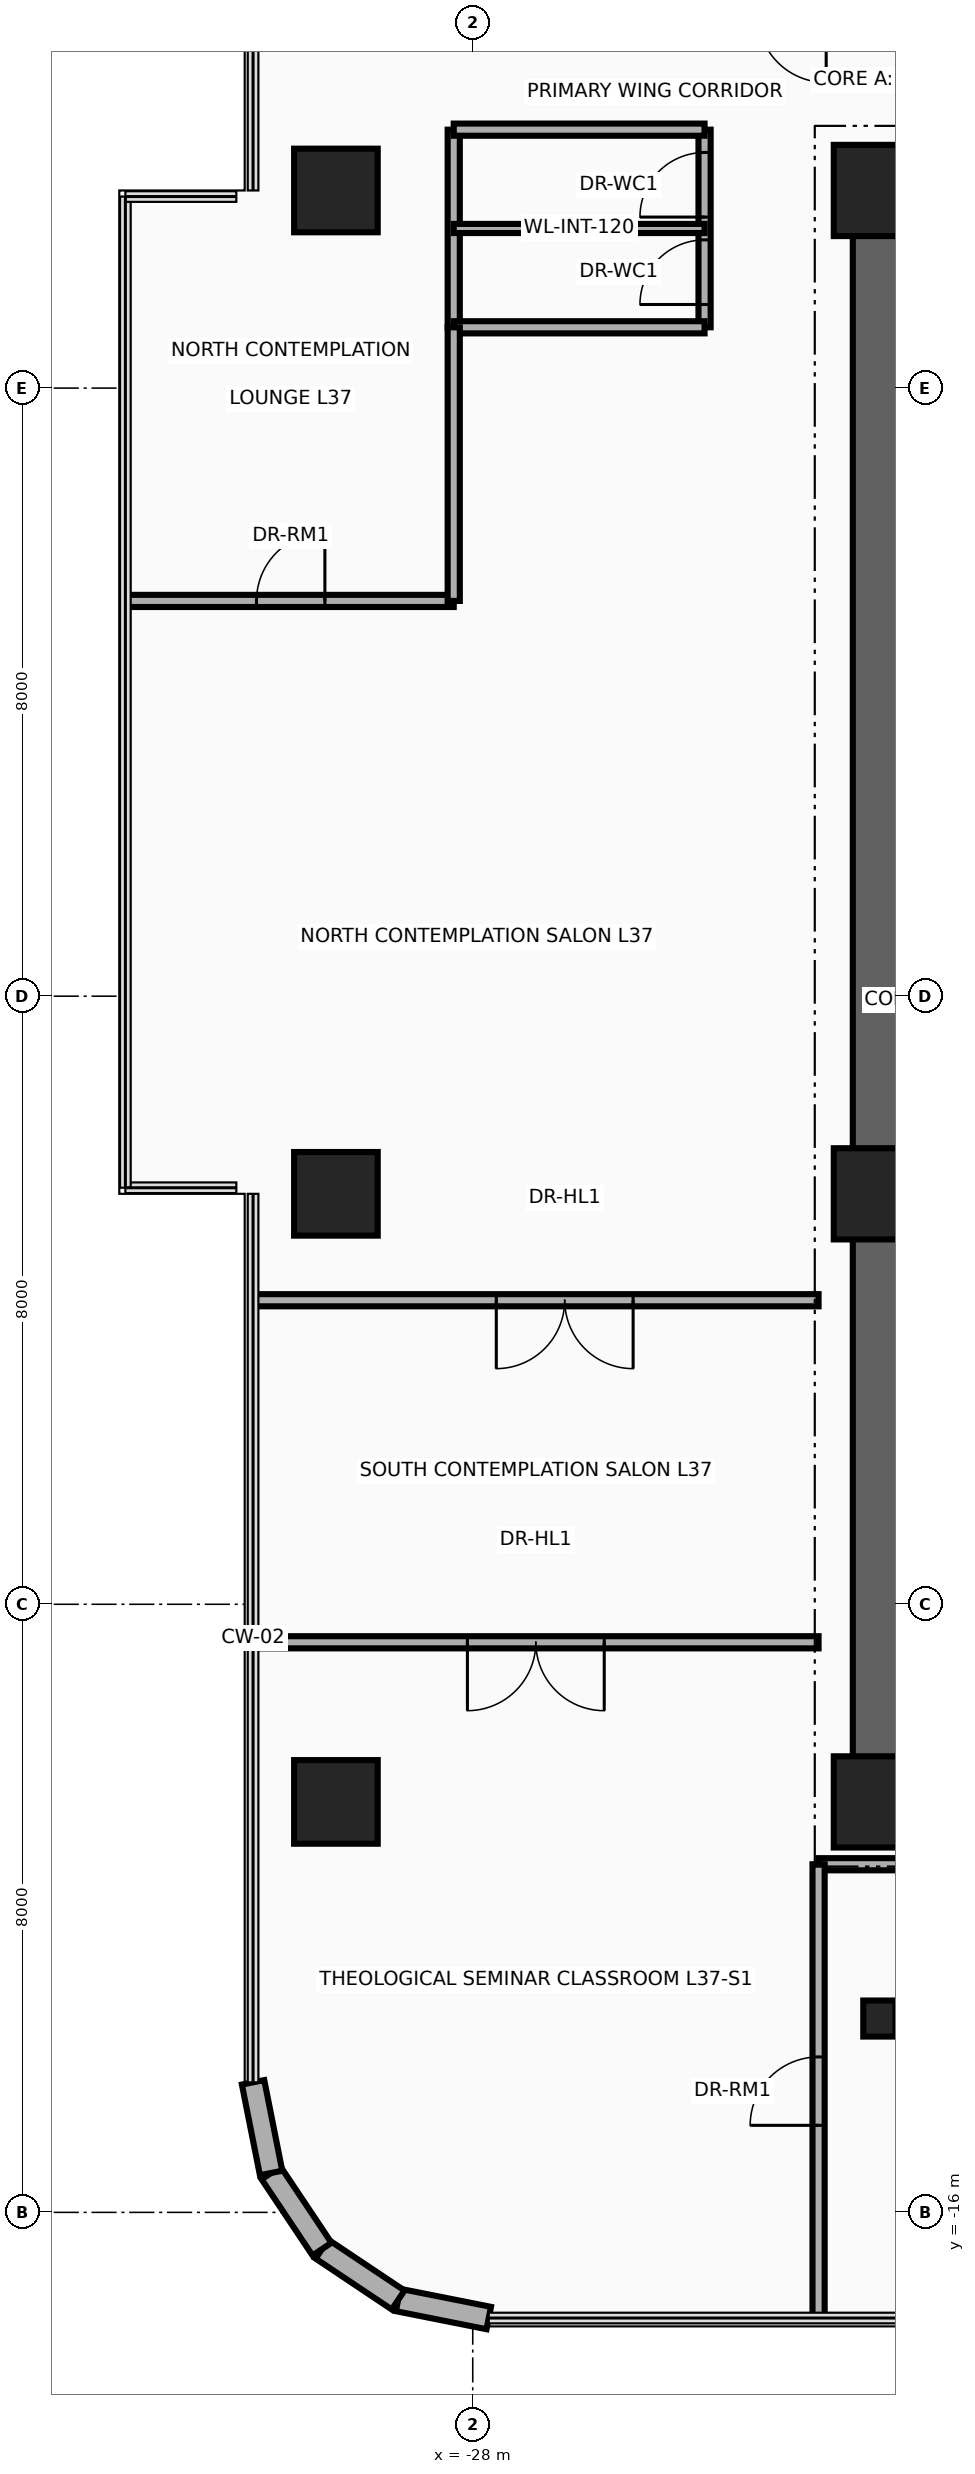
"""IFC4 building model, lengths in metres.
Left out: names, types, materials, properties, quantities, classifications, styles, units other than length and angle.
Written with IfcOpenShell. Run it as: python <this file> out.ifc"""

import sys

from ifc_helpers import new_model, si_unit, direction, frame, frame_2d, origin, origin_2d, place, context, subcontext, project, spatial, rectangle, circle, i_section, extrude, source, transform, mapped, element, fill, save


model = new_model("IFC4")
c1 = context("Model", 3, precision=1e-05, world=origin(), true_north=direction((0.0, 1.0)))
c2 = subcontext(c1, "Body", "Model", "MODEL_VIEW")
j1 = project(units=[si_unit("LENGTHUNIT", "METRE"), si_unit("PLANEANGLEUNIT", "RADIAN")], contexts=[c1])
p1 = place(None, origin())
s1 = spatial("IfcSite", under=j1, at=p1, CompositionType="ELEMENT")
p2 = place(p1, origin())
s2 = spatial("IfcBuilding", under=s1, at=p2, CompositionType="ELEMENT")
p3 = place(p2, frame((0.0, 0.0, 146.4)))
s3 = spatial("IfcBuildingStorey", under=s2, at=p3, CompositionType="ELEMENT", Elevation=146.4)
p4 = place(p3, frame((-22.65, -11.15, 0.0), z_axis=(0.0, 0.0, 1.0), x_axis=(0.0, 1.0, 0.0)))
e1 = element("IfcWall", 1, at=p4, inside=s3, PredefinedType="SHEAR", context=c2, shape_type="SweptSolid", body=[
    extrude(rectangle(XDim=22.3, YDim=0.7, at=frame_2d((11.15, 0.0))), origin(), (0.0, 0.0, 1.0), 3.46),
])
for number, where, z_axis, x_axis in (
    (2, (-22.65, 10.8, 0.0), (0.0, 0.0, 1.0), (1.0, 0.0, 0.0)),
    (3, (-22.65, -10.8, 0.0), (0.0, 0.0, 1.0), (1.0, 0.0, 0.0)),
):
    element("IfcWall", number, at=place(p3, frame(where, z_axis=z_axis, x_axis=x_axis)), inside=s3, PredefinedType="SHEAR", context=c2, shape_type="SweptSolid", body=[
        extrude(rectangle(XDim=10.25, YDim=0.7, at=frame_2d((5.125, 0.0))), origin(), (0.0, 0.0, 1.0), 3.46),
    ])
m1 = source(origin(), c2, "Body", "SweptSolid", [
    extrude(circle(Radius=0.55, at=origin_2d()), origin(), (0.0, 0.0, 1.0), 3.7),
])
p5 = place(p3, frame((-29.8, -10.6, 0.0), z_axis=(0.0, 0.0, 1.0), x_axis=(1.0, 0.0, 0.0)))
e4 = element("IfcColumn", 4, at=p5, inside=s3, PredefinedType="COLUMN", context=c2, shape_type="MappedRepresentation", body=[
    mapped(m1, transform((0.0, 0.0, 0.0), x_axis=(1.0, 0.0, 0.0), y_axis=(0.0, 1.0, 0.0), z_axis=(0.0, 0.0, 1.0), scale=1.0)),
])
m2 = source(origin(), c2, "Body", "SweptSolid", [
    extrude(rectangle(XDim=1.2, YDim=1.2, at=origin_2d()), origin(), (0.0, 0.0, 1.0), 3.7),
])
p6 = place(p3, frame((-22.65, -10.6, 0.0), z_axis=(0.0, 0.0, 1.0), x_axis=(1.0, 0.0, 0.0)))
e5 = element("IfcColumn", 5, at=p6, inside=s3, PredefinedType="COLUMN", context=c2, shape_type="MappedRepresentation", body=[
    mapped(m2, transform((0.0, 0.0, 0.0), x_axis=(1.0, 0.0, 0.0), y_axis=(0.0, 1.0, 0.0), z_axis=(0.0, 0.0, 1.0), scale=1.0)),
])
p7 = place(p3, frame((-29.8, -2.6, 0.0), z_axis=(0.0, 0.0, 1.0), x_axis=(1.0, 0.0, 0.0)))
e6 = element("IfcColumn", 6, at=p7, inside=s3, PredefinedType="COLUMN", context=c2, shape_type="MappedRepresentation", body=[
    mapped(m1, transform((0.0, 0.0, 0.0), x_axis=(1.0, 0.0, 0.0), y_axis=(0.0, 1.0, 0.0), z_axis=(0.0, 0.0, 1.0), scale=1.0)),
])
p8 = place(p3, frame((-22.65, -2.6, 0.0), z_axis=(0.0, 0.0, 1.0), x_axis=(1.0, 0.0, 0.0)))
e7 = element("IfcColumn", 7, at=p8, inside=s3, PredefinedType="COLUMN", context=c2, shape_type="MappedRepresentation", body=[
    mapped(m2, transform((0.0, 0.0, 0.0), x_axis=(1.0, 0.0, 0.0), y_axis=(0.0, 1.0, 0.0), z_axis=(0.0, 0.0, 1.0), scale=1.0)),
])
p9 = place(p3, frame((-29.8, 10.6, 0.0), z_axis=(0.0, 0.0, 1.0), x_axis=(1.0, 0.0, 0.0)))
e8 = element("IfcColumn", 8, at=p9, inside=s3, PredefinedType="COLUMN", context=c2, shape_type="MappedRepresentation", body=[
    mapped(m1, transform((0.0, 0.0, 0.0), x_axis=(1.0, 0.0, 0.0), y_axis=(0.0, 1.0, 0.0), z_axis=(0.0, 0.0, 1.0), scale=1.0)),
])
p10 = place(p3, frame((-22.65, 10.6, 0.0), z_axis=(0.0, 0.0, 1.0), x_axis=(1.0, 0.0, 0.0)))
e9 = element("IfcColumn", 9, at=p10, inside=s3, PredefinedType="COLUMN", context=c2, shape_type="MappedRepresentation", body=[
    mapped(m2, transform((0.0, 0.0, 0.0), x_axis=(1.0, 0.0, 0.0), y_axis=(0.0, 1.0, 0.0), z_axis=(0.0, 0.0, 1.0), scale=1.0)),
])
m3 = source(origin(), c2, "Body", "SweptSolid", [
    extrude(i_section(OverallWidth=0.424, OverallDepth=0.474, WebThickness=0.048, FlangeThickness=0.077, at=origin_2d()), origin(), (0.0, 0.0, 1.0), 3.7),
])
p11 = place(p3, frame((-22.65, -13.45, 0.0), z_axis=(0.0, 0.0, 1.0), x_axis=(1.0, 0.0, 0.0)))
e10 = element("IfcColumn", 10, at=p11, inside=s3, PredefinedType="COLUMN", context=c2, shape_type="MappedRepresentation", body=[
    mapped(m3, transform((0.0, 0.0, 0.0), x_axis=(1.0, 0.0, 0.0), y_axis=(0.0, 1.0, 0.0), z_axis=(0.0, 0.0, 1.0), scale=1.0)),
])
p12 = place(p3, frame((-27.789, -17.39, 0.0), z_axis=(0.0, 0.0, 1.0), x_axis=(-0.980804027463, 0.194996050505, 0.0)))
e11 = element("IfcWall", 11, at=p12, inside=s3, PredefinedType="SOLIDWALL", context=c2, shape_type="SweptSolid", body=[
    extrude(rectangle(XDim=1.216, YDim=0.3, at=frame_2d((0.608, 0.0))), origin(), (0.0, 0.0, 1.0), 3.46),
])
for number, where, z_axis, x_axis in (
    (12, (-28.982, -17.153, 0.0), (0.0, 0.0, 1.0), (-0.831, 0.556, 0.0)),
    (13, (-29.983, -16.483, 0.0), (0.0, 0.0, 1.0), (-0.556, 0.831, 0.0)),
):
    element("IfcWall", number, at=place(p3, frame(where, z_axis=z_axis, x_axis=x_axis)), inside=s3, PredefinedType="SOLIDWALL", context=c2, shape_type="SweptSolid", body=[
        extrude(rectangle(XDim=1.205, YDim=0.3, at=frame_2d((0.603, 0.0))), origin(), (0.0, 0.0, 1.0), 3.46),
    ])
p13 = place(p3, frame((-30.653, -15.482, 0.0), z_axis=(0.0, 0.0, 1.0), x_axis=(-0.194996050505, 0.980804027463, 0.0)))
e14 = element("IfcWall", 14, at=p13, inside=s3, PredefinedType="SOLIDWALL", context=c2, shape_type="SweptSolid", body=[
    extrude(rectangle(XDim=1.216, YDim=0.3, at=frame_2d((0.608, 0.0))), origin(), (0.0, 0.0, 1.0), 3.46),
])
p14 = place(p3, frame((-28.25, 8.8, 0.0), z_axis=(0.0, 0.0, 1.0), x_axis=(0.0, 1.0, 0.0)))
e15 = element("IfcWall", 15, at=p14, inside=s3, PredefinedType="PARTITIONING", context=c2, shape_type="SweptSolid", body=[
    extrude(rectangle(XDim=2.6, YDim=0.16, at=frame_2d((1.3, 0.0))), origin(), (0.0, 0.0, 1.0), 2.666),
])
p15 = place(p3, frame((-24.95, 8.8, 0.0), z_axis=(0.0, 0.0, 1.0), x_axis=(0.0, 1.0, 0.0)))
e16 = element("IfcWall", 16, at=p15, inside=s3, PredefinedType="PARTITIONING", context=c2, shape_type="SweptSolid", body=[
    extrude(rectangle(XDim=2.6, YDim=0.16, at=frame_2d((1.3, 0.0))), origin(), (0.0, 0.0, 1.0), 2.666),
])
p16 = place(p15, frame((0.3, 0.0, 0.0)))
e17 = element("IfcOpeningElement", 17, at=p16, cuts=e16, PredefinedType="OPENING", context=c2, shape_type="SweptSolid", body=[
    extrude(rectangle(XDim=0.85, YDim=2.1, at=frame_2d((0.425, 1.05))), frame((0.0, 0.095, 0.0), z_axis=(0.0, -1.0, 0.0), x_axis=(1.0, 0.0, 0.0)), (0.0, 0.0, 1.0), 0.19),
])
p17 = place(p15, frame((1.45, 0.0, 0.0)))
e18 = element("IfcOpeningElement", 18, at=p17, cuts=e16, PredefinedType="OPENING", context=c2, shape_type="SweptSolid", body=[
    extrude(rectangle(XDim=0.85, YDim=2.1, at=frame_2d((0.425, 1.05))), frame((0.0, 0.095, 0.0), z_axis=(0.0, -1.0, 0.0), x_axis=(1.0, 0.0, 0.0)), (0.0, 0.0, 1.0), 0.19),
])
for number, where, z_axis, x_axis in (
    (19, (-28.25, 8.8, 0.0), (0.0, 0.0, 1.0), (1.0, 0.0, 0.0)),
    (20, (-28.25, 11.4, 0.0), (0.0, 0.0, 1.0), (1.0, 0.0, 0.0)),
):
    element("IfcWall", number, at=place(p3, frame(where, z_axis=z_axis, x_axis=x_axis)), inside=s3, PredefinedType="PARTITIONING", context=c2, shape_type="SweptSolid", body=[
        extrude(rectangle(XDim=3.3, YDim=0.16, at=frame_2d((1.65, 0.0))), origin(), (0.0, 0.0, 1.0), 3.46),
    ])
p18 = place(p3, frame((-28.25, 10.1, 0.0), z_axis=(0.0, 0.0, 1.0), x_axis=(1.0, 0.0, 0.0)))
e21 = element("IfcWall", 21, at=p18, inside=s3, PredefinedType="PARTITIONING", context=c2, shape_type="SweptSolid", body=[
    extrude(rectangle(XDim=3.3, YDim=0.12, at=frame_2d((1.65, 0.0))), origin(), (0.0, 0.0, 1.0), 3.46),
])
p19 = place(p3, frame((-23.45, -11.42, 0.0), z_axis=(0.0, 0.0, 1.0), x_axis=(1.0, 0.0, 0.0)))
e22 = element("IfcWall", 22, at=p19, inside=s3, PredefinedType="PARTITIONING", context=c2, shape_type="SweptSolid", body=[
    extrude(rectangle(XDim=13.84, YDim=0.16, at=frame_2d((6.92, 0.0))), origin(), (0.0, 0.0, 1.0), 2.834),
])
p20 = place(p3, frame((-23.45, -17.39, 0.0), z_axis=(0.0, 0.0, 1.0), x_axis=(0.0, 1.0, 0.0)))
e23 = element("IfcWall", 23, at=p20, inside=s3, PredefinedType="PARTITIONING", context=c2, shape_type="SweptSolid", body=[
    extrude(rectangle(XDim=5.97, YDim=0.16, at=frame_2d((2.985, 0.0))), origin(), (0.0, 0.0, 1.0), 3.46),
])
p21 = place(p20, frame((2.535, 0.0, 0.0)))
e24 = element("IfcOpeningElement", 24, at=p21, cuts=e23, PredefinedType="OPENING", context=c2, shape_type="SweptSolid", body=[
    extrude(rectangle(XDim=0.9, YDim=2.1, at=frame_2d((0.45, 1.05))), frame((0.0, 0.095, 0.0), z_axis=(0.0, -1.0, 0.0), x_axis=(1.0, 0.0, 0.0)), (0.0, 0.0, 1.0), 0.19),
])
p22 = place(p3, frame((-30.89, -8.5, 0.0), z_axis=(0.0, 0.0, 1.0), x_axis=(1.0, 0.0, 0.0)))
e25 = element("IfcWall", 25, at=p22, inside=s3, PredefinedType="PARTITIONING", context=c2, shape_type="SweptSolid", body=[
    extrude(rectangle(XDim=7.44, YDim=0.16, at=frame_2d((3.72, 0.0))), origin(), (0.0, 0.0, 1.0), 2.896),
])
p23 = place(p22, frame((2.82, 0.0, 0.0)))
e26 = element("IfcOpeningElement", 26, at=p23, cuts=e25, PredefinedType="OPENING", context=c2, shape_type="SweptSolid", body=[
    extrude(rectangle(XDim=1.8, YDim=2.15, at=frame_2d((0.9, 1.075))), frame((0.0, 0.095, 0.0), z_axis=(0.0, -1.0, 0.0), x_axis=(1.0, 0.0, 0.0)), (0.0, 0.0, 1.0), 0.19),
])
p24 = place(p3, frame((-32.54, 5.2, 0.0), z_axis=(0.0, 0.0, 1.0), x_axis=(1.0, 0.0, 0.0)))
e27 = element("IfcWall", 27, at=p24, inside=s3, PredefinedType="PARTITIONING", context=c2, shape_type="SweptSolid", body=[
    extrude(rectangle(XDim=4.29, YDim=0.16, at=frame_2d((2.145, 0.0))), origin(), (0.0, 0.0, 1.0), 2.896),
])
p25 = place(p24, frame((1.695, 0.0, 0.0)))
e28 = element("IfcOpeningElement", 28, at=p25, cuts=e27, PredefinedType="OPENING", context=c2, shape_type="SweptSolid", body=[
    extrude(rectangle(XDim=0.9, YDim=2.1, at=frame_2d((0.45, 1.05))), frame((0.0, 0.095, 0.0), z_axis=(0.0, -1.0, 0.0), x_axis=(1.0, 0.0, 0.0)), (0.0, 0.0, 1.0), 0.19),
])
p26 = place(p3, frame((-28.25, 5.2, 0.0), z_axis=(0.0, 0.0, 1.0), x_axis=(0.0, 1.0, 0.0)))
e29 = element("IfcWall", 29, at=p26, inside=s3, PredefinedType="PARTITIONING", context=c2, shape_type="SweptSolid", body=[
    extrude(rectangle(XDim=3.6, YDim=0.16, at=frame_2d((1.8, 0.0))), origin(), (0.0, 0.0, 1.0), 2.988),
])
p27 = place(p3, frame((-30.89, -4.0, 0.0), z_axis=(0.0, 0.0, 1.0), x_axis=(1.0, 0.0, 0.0)))
e30 = element("IfcWall", 30, at=p27, inside=s3, PredefinedType="PARTITIONING", context=c2, shape_type="SweptSolid", body=[
    extrude(rectangle(XDim=7.44, YDim=0.16, at=frame_2d((3.72, 0.0))), origin(), (0.0, 0.0, 1.0), 2.896),
])
p28 = place(p27, frame((3.2, 0.0, 0.0)))
e31 = element("IfcOpeningElement", 31, at=p28, cuts=e30, PredefinedType="OPENING", context=c2, shape_type="SweptSolid", body=[
    extrude(rectangle(XDim=1.8, YDim=2.15, at=frame_2d((0.9, 1.075))), frame((0.0, 0.095, 0.0), z_axis=(0.0, -1.0, 0.0), x_axis=(1.0, 0.0, 0.0)), (0.0, 0.0, 1.0), 0.19),
])
p29 = place(p16, origin())
e32 = element("IfcDoor", 32, at=p29, inside=s3, OperationType="SINGLE_SWING_LEFT", PredefinedType="DOOR", context=c2, shape_type="SweptSolid", body=[
    extrude(rectangle(XDim=0.85, YDim=2.1, at=frame_2d((0.425, 1.05))), frame((0.0, 0.025, 0.0), z_axis=(0.0, -1.0, 0.0), x_axis=(1.0, 0.0, 0.0)), (0.0, 0.0, 1.0), 0.05),
])
fill(e17, e32)
p30 = place(p17, origin())
e33 = element("IfcDoor", 33, at=p30, inside=s3, OperationType="SINGLE_SWING_RIGHT", PredefinedType="DOOR", context=c2, shape_type="SweptSolid", body=[
    extrude(rectangle(XDim=0.85, YDim=2.1, at=frame_2d((0.425, 1.05))), frame((0.0, 0.025, 0.0), z_axis=(0.0, -1.0, 0.0), x_axis=(1.0, 0.0, 0.0)), (0.0, 0.0, 1.0), 0.05),
])
fill(e18, e33)
p31 = place(p23, frame((1.8, 0.0, 0.0), z_axis=(0.0, 0.0, 1.0), x_axis=(-1.0, 0.0, 0.0)))
e34 = element("IfcDoor", 34, at=p31, inside=s3, OperationType="DOUBLE_DOOR_SINGLE_SWING", PredefinedType="DOOR", context=c2, shape_type="SweptSolid", body=[
    extrude(rectangle(XDim=1.8, YDim=2.15, at=frame_2d((0.9, 1.075))), frame((0.0, 0.025, 0.0), z_axis=(0.0, -1.0, 0.0), x_axis=(1.0, 0.0, 0.0)), (0.0, 0.0, 1.0), 0.05),
])
fill(e26, e34)
p32 = place(p25, origin())
e35 = element("IfcDoor", 35, at=p32, inside=s3, OperationType="SINGLE_SWING_RIGHT", PredefinedType="DOOR", context=c2, shape_type="SweptSolid", body=[
    extrude(rectangle(XDim=0.9, YDim=2.1, at=frame_2d((0.45, 1.05))), frame((0.0, 0.025, 0.0), z_axis=(0.0, -1.0, 0.0), x_axis=(1.0, 0.0, 0.0)), (0.0, 0.0, 1.0), 0.05),
])
fill(e28, e35)
p33 = place(p28, frame((1.8, 0.0, 0.0), z_axis=(0.0, 0.0, 1.0), x_axis=(-1.0, 0.0, 0.0)))
e36 = element("IfcDoor", 36, at=p33, inside=s3, OperationType="DOUBLE_DOOR_SINGLE_SWING", PredefinedType="DOOR", context=c2, shape_type="SweptSolid", body=[
    extrude(rectangle(XDim=1.8, YDim=2.15, at=frame_2d((0.9, 1.075))), frame((0.0, 0.025, 0.0), z_axis=(0.0, -1.0, 0.0), x_axis=(1.0, 0.0, 0.0)), (0.0, 0.0, 1.0), 0.05),
])
fill(e31, e36)
p34 = place(p21, origin())
e37 = element("IfcDoor", 37, at=p34, inside=s3, OperationType="SINGLE_SWING_RIGHT", PredefinedType="DOOR", context=c2, shape_type="SweptSolid", body=[
    extrude(rectangle(XDim=0.9, YDim=2.1, at=frame_2d((0.45, 1.05))), frame((0.0, 0.025, 0.0), z_axis=(0.0, -1.0, 0.0), x_axis=(1.0, 0.0, 0.0)), (0.0, 0.0, 1.0), 0.05),
])
fill(e24, e37)
save(model, sys.argv[1])
